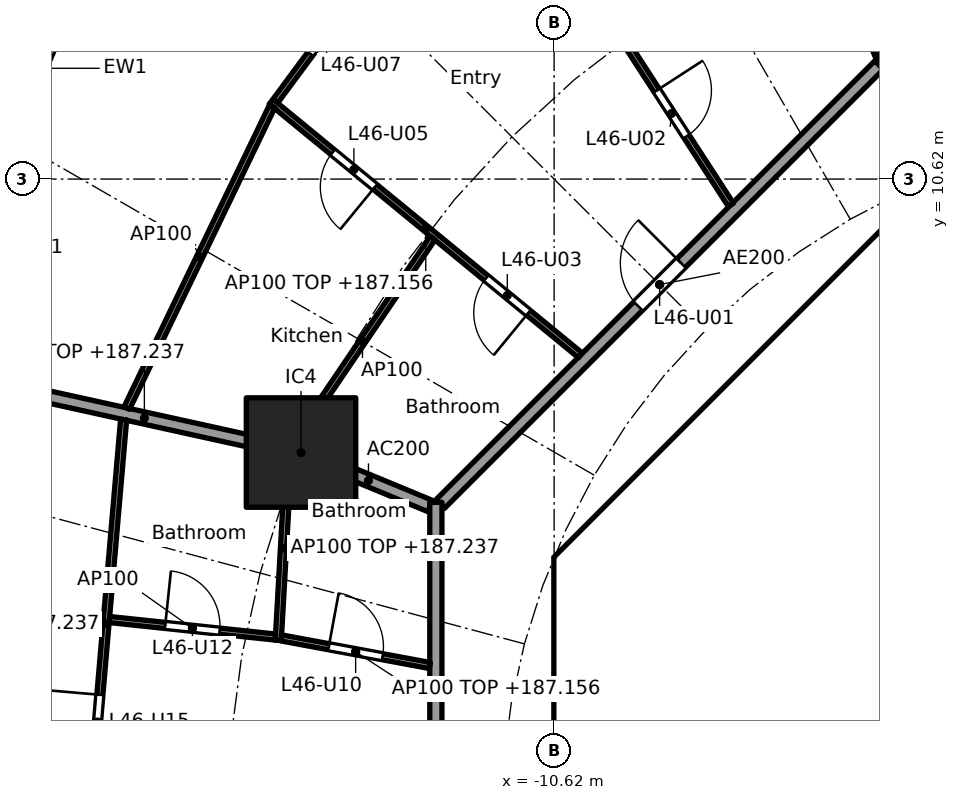
"""IFC4 building model, lengths in metres.
Left out: names, types, materials, properties, quantities, classifications, styles, units other than length and angle.
Written with IfcOpenShell. Run it as: python <this file> out.ifc"""

import sys

from ifc_helpers import new_model, si_unit, direction, frame, frame_2d, origin, origin_2d, place, context, subcontext, project, spatial, polyline, rectangle, outline, extrude, element, fill, save


model = new_model("IFC4")
c1 = context("Model", 3, precision=1e-05, world=origin(), true_north=direction((0.0, 1.0)))
c2 = subcontext(c1, "Body", "Model", "MODEL_VIEW")
j1 = project(units=[si_unit("LENGTHUNIT", "METRE"), si_unit("PLANEANGLEUNIT", "RADIAN")], contexts=[c1])
p1 = place(None, origin())
s1 = spatial("IfcSite", under=j1, at=p1, CompositionType="ELEMENT")
p2 = place(p1, origin())
s2 = spatial("IfcBuilding", under=s1, at=p2, CompositionType="ELEMENT")
p3 = place(p2, frame((0.0, 0.0, 184.4)))
s3 = spatial("IfcBuildingStorey", under=s2, at=p3, CompositionType="ELEMENT", Elevation=184.4)
p4 = place(p3, frame((-14.782, 6.123, 0.0), z_axis=(0.0, 0.0, 1.0), x_axis=(1.0, 0.0, 0.0)))
e1 = element("IfcColumn", 1, at=p4, inside=s3, PredefinedType="COLUMN", context=c2, shape_type="SweptSolid", body=[
    extrude(rectangle(XDim=1.8, YDim=1.8, at=origin_2d()), origin(), (0.0, 0.0, 1.0), 3.7),
])
p5 = place(p3, frame((-19.729, 11.0, 0.0), z_axis=(0.0, 0.0, 1.0), x_axis=(0.397620521824, 0.917549955384, 0.0)))
e2 = element("IfcWall", 2, at=p5, inside=s3, PredefinedType="SOLIDWALL", context=c2, shape_type="SweptSolid", body=[
    extrude(rectangle(XDim=3.142, YDim=0.25, at=frame_2d((1.571, 0.0))), origin(), (0.0, 0.0, 1.0), 3.44),
])
p6 = place(p5, frame((0.521, 0.0, 0.0)))
e3 = element("IfcOpeningElement", 3, at=p6, cuts=e2, PredefinedType="OPENING", context=c2, shape_type="SweptSolid", body=[
    extrude(rectangle(XDim=2.1, YDim=2.4, at=frame_2d((1.05, 1.2))), frame((0.0, 0.135, 0.0), z_axis=(0.0, -1.0, 0.0), x_axis=(1.0, 0.0, 0.0)), (0.0, 0.0, 1.0), 0.27),
])
p7 = place(p3, frame((-4.613, 9.988, 0.0), z_axis=(0.0, 0.0, 1.0), x_axis=(-0.707106781187, -0.707106781187, 0.0)))
e4 = element("IfcWall", 4, at=p7, inside=s3, PredefinedType="SHEAR", context=c2, shape_type="SweptSolid", body=[
    extrude(rectangle(XDim=7.602, YDim=0.6, at=frame_2d((3.801, 0.0))), origin(), (0.0, 0.0, 1.0), 3.44),
])
p8 = place(p7, frame((0.351, 0.0, 0.0)))
e5 = element("IfcOpeningElement", 5, at=p8, cuts=e4, PredefinedType="OPENING", context=c2, shape_type="SweptSolid", body=[
    extrude(rectangle(XDim=1.1, YDim=2.1, at=frame_2d((0.55, 1.05))), frame((0.0, 0.31, 0.0), z_axis=(0.0, -1.0, 0.0), x_axis=(1.0, 0.0, 0.0)), (0.0, 0.0, 1.0), 0.62),
])
p9 = place(p3, frame((-10.325, 3.801, 0.0), z_axis=(0.0, 0.0, 1.0), x_axis=(0.0, -1.0, 0.0)))
e6 = element("IfcWall", 6, at=p9, inside=s3, PredefinedType="SHEAR", context=c2, shape_type="SweptSolid", body=[
    extrude(rectangle(XDim=7.602, YDim=0.6, at=frame_2d((3.801, 0.0))), origin(), (0.0, 0.0, 1.0), 3.44),
])
p10 = place(p9, frame((0.651, 0.0, 0.0)))
e7 = element("IfcOpeningElement", 7, at=p10, cuts=e6, PredefinedType="OPENING", context=c2, shape_type="SweptSolid", body=[
    extrude(rectangle(XDim=1.5, YDim=2.1, at=frame_2d((0.75, 1.05))), frame((0.0, 0.31, 0.0), z_axis=(0.0, -1.0, 0.0), x_axis=(1.0, 0.0, 0.0)), (0.0, 0.0, 1.0), 0.62),
])
p11 = place(p9, frame((5.451, 0.0, 0.0)))
e8 = element("IfcOpeningElement", 8, at=p11, cuts=e6, PredefinedType="OPENING", context=c2, shape_type="SweptSolid", body=[
    extrude(rectangle(XDim=1.5, YDim=2.1, at=frame_2d((0.75, 1.05))), frame((0.0, 0.31, 0.0), z_axis=(0.0, -1.0, 0.0), x_axis=(1.0, 0.0, 0.0)), (0.0, 0.0, 1.0), 0.62),
])
p12 = place(p3, frame((-6.2, 4.3, 0.0), z_axis=(0.0, 0.0, 1.0), x_axis=(0.0, 1.0, 0.0)))
e9 = element("IfcWall", 9, at=p12, inside=s3, PredefinedType="PARTITIONING", context=c2, shape_type="SweptSolid", body=[
    extrude(rectangle(XDim=3.527, YDim=0.15, at=frame_2d((1.763, 0.0))), origin(), (0.0, 0.0, 1.0), 3.44),
])
p13 = place(p12, frame((0.262, 0.0, 0.0)))
e10 = element("IfcOpeningElement", 10, at=p13, cuts=e9, PredefinedType="OPENING", context=c2, shape_type="SweptSolid", body=[
    extrude(rectangle(XDim=0.9, YDim=2.1, at=frame_2d((0.45, 1.05))), frame((0.0, 0.085, 0.0), z_axis=(0.0, -1.0, 0.0), x_axis=(1.0, 0.0, 0.0)), (0.0, 0.0, 1.0), 0.17),
])
p14 = place(p12, frame((2.138, 0.0, 0.0)))
e11 = element("IfcOpeningElement", 11, at=p14, cuts=e9, PredefinedType="OPENING", context=c2, shape_type="SweptSolid", body=[
    extrude(rectangle(XDim=0.9, YDim=2.1, at=frame_2d((0.45, 1.05))), frame((0.0, 0.085, 0.0), z_axis=(0.0, -1.0, 0.0), x_axis=(1.0, 0.0, 0.0)), (0.0, 0.0, 1.0), 0.17),
])
p15 = place(p3, frame((-6.7, 2.0, 0.0), z_axis=(0.0, 0.0, 1.0), x_axis=(1.0, 0.0, 0.0)))
e12 = element("IfcWall", 12, at=p15, inside=s3, PredefinedType="SOLIDWALL", context=c2, shape_type="SweptSolid", body=[
    extrude(rectangle(XDim=13.4, YDim=0.2, at=frame_2d((6.7, 0.0))), origin(), (0.0, 0.0, 1.0), 3.44),
])
p16 = place(p15, frame((7.25, 0.0, 0.0)))
e13 = element("IfcOpeningElement", 13, at=p16, cuts=e12, PredefinedType="OPENING", context=c2, shape_type="SweptSolid", body=[
    extrude(rectangle(XDim=1.1, YDim=2.1, at=frame_2d((0.55, 1.05))), frame((0.0, 0.11, 0.0), z_axis=(0.0, -1.0, 0.0), x_axis=(1.0, 0.0, 0.0)), (0.0, 0.0, 1.0), 0.22),
])
p17 = place(p15, frame((9.45, 0.0, 0.0)))
e14 = element("IfcOpeningElement", 14, at=p17, cuts=e12, PredefinedType="OPENING", context=c2, shape_type="SweptSolid", body=[
    extrude(rectangle(XDim=1.1, YDim=2.1, at=frame_2d((0.55, 1.05))), frame((0.0, 0.11, 0.0), z_axis=(0.0, -1.0, 0.0), x_axis=(1.0, 0.0, 0.0)), (0.0, 0.0, 1.0), 0.22),
])
p18 = place(p15, frame((1.85, 0.0, 0.0)))
e15 = element("IfcOpeningElement", 15, at=p18, cuts=e12, PredefinedType="OPENING", context=c2, shape_type="SweptSolid", body=[
    extrude(rectangle(XDim=0.9, YDim=2.1, at=frame_2d((0.45, 1.05))), frame((0.0, 0.11, 0.0), z_axis=(0.0, -1.0, 0.0), x_axis=(1.0, 0.0, 0.0)), (0.0, 0.0, 1.0), 0.22),
])
p19 = place(p15, frame((5.15, 0.0, 0.0)))
e16 = element("IfcOpeningElement", 16, at=p19, cuts=e12, PredefinedType="OPENING", context=c2, shape_type="SweptSolid", body=[
    extrude(rectangle(XDim=0.9, YDim=2.1, at=frame_2d((0.45, 1.05))), frame((0.0, 0.11, 0.0), z_axis=(0.0, -1.0, 0.0), x_axis=(1.0, 0.0, 0.0)), (0.0, 0.0, 1.0), 0.22),
])
p20 = place(p3, origin())
e17 = element("IfcWall", 17, at=p20, inside=s3, PredefinedType="SHEAR", context=c2, shape_type="SweptSolid", body=[
    extrude(outline(polyline([(-10.2, 4.825), (-9.776, 4.401), (-10.025, 4.152), (-10.025, 3.801), (-10.625, 3.801), (-10.625, 4.401), (-10.2, 4.825)])), origin(), (0.0, 0.0, 1.0), 3.44),
])
p21 = place(p3, frame((-10.025, 4.0, 0.0), z_axis=(0.0, 0.0, 1.0), x_axis=(1.0, 0.0, 0.0)))
e18 = element("IfcWall", 18, at=p21, inside=s3, PredefinedType="PARTITIONING", context=c2, shape_type="SweptSolid", body=[
    extrude(rectangle(XDim=3.325, YDim=0.2, at=frame_2d((1.662, 0.0))), origin(), (0.0, 0.0, 1.0), 3.44),
])
p22 = place(p3, frame((-8.301, 5.8, 0.0), z_axis=(0.0, 0.0, 1.0), x_axis=(1.0, 0.0, 0.0)))
e19 = element("IfcWall", 19, at=p22, inside=s3, PredefinedType="PARTITIONING", context=c2, shape_type="SweptSolid", body=[
    extrude(rectangle(XDim=2.026, YDim=0.15, at=frame_2d((1.013, 0.0))), origin(), (0.0, 0.0, 1.0), 3.44),
])
p23 = place(p3, origin())
e20 = element("IfcWall", 20, at=p23, inside=s3, PredefinedType="SOLIDWALL", context=c2, shape_type="SweptSolid", body=[
    extrude(outline(polyline([(-6.7, 4.3), (6.7, 4.3), (6.7, 2.1), (6.5, 2.1), (6.5, 4.1), (4.5, 4.1), (4.5, 2.1), (4.3, 2.1), (4.3, 4.1), (2.3, 4.1), (2.3, 2.1), (2.1, 2.1), (2.1, 4.1), (0.1, 4.1), (0.1, 2.1), (-0.1, 2.1), (-0.1, 4.1), (-2.1, 4.1), (-2.1, 2.1), (-2.3, 2.1), (-2.3, 4.1), (-6.5, 4.1), (-6.5, 2.1), (-6.7, 2.1), (-6.7, 4.3)])), origin(), (0.0, 0.0, 1.0), 3.44),
])
p24 = place(p3, frame((-5.243, 12.657, 0.0), z_axis=(0.0, 0.0, 1.0), x_axis=(-0.382707856524, 0.923869415315, 0.0)))
e21 = element("IfcWall", 21, at=p24, inside=s3, PredefinedType="PARTITIONING", context=c2, shape_type="SweptSolid", body=[
    extrude(rectangle(XDim=2.2, YDim=0.2, at=frame_2d((1.1, 0.0))), origin(), (0.0, 0.0, 1.0), 3.44),
])
p25 = place(p3, frame((-12.657, 5.243, 0.0), z_axis=(0.0, 0.0, 1.0), x_axis=(-0.923859888513, 0.38273085373, 0.0)))
e22 = element("IfcWall", 22, at=p25, inside=s3, PredefinedType="PARTITIONING", context=c2, shape_type="SweptSolid", body=[
    extrude(rectangle(XDim=2.199, YDim=0.2, at=frame_2d((1.1, 0.0))), origin(), (0.0, 0.0, 1.0), 3.44),
])
p26 = place(p3, frame((-14.831, 6.134, 0.0), z_axis=(0.0, 0.0, 1.0), x_axis=(-0.976568396888, 0.215207263354, 0.0)))
e23 = element("IfcWall", 23, at=p26, inside=s3, PredefinedType="PARTITIONING", context=c2, shape_type="SweptSolid", body=[
    extrude(rectangle(XDim=5.177, YDim=0.2, at=frame_2d((2.588, 0.0))), origin(), (0.0, 0.0, 1.0), 2.837),
])
p27 = place(p3, frame((5.104, 12.565, 0.0), z_axis=(0.0, 0.0, 1.0), x_axis=(-1.0, 0.0, 0.0)))
e24 = element("IfcWall", 24, at=p27, inside=s3, PredefinedType="PARTITIONING", context=c2, shape_type="SweptSolid", body=[
    extrude(rectangle(XDim=10.409, YDim=0.2, at=frame_2d((5.205, 0.0))), origin(), (0.0, 0.0, 1.0), 3.44),
])
p28 = place(p27, frame((6.339, 0.0, 0.0)))
e25 = element("IfcOpeningElement", 25, at=p28, cuts=e24, PredefinedType="OPENING", context=c2, shape_type="SweptSolid", body=[
    extrude(rectangle(XDim=1.0, YDim=2.1, at=frame_2d((0.5, 1.05))), frame((0.0, 0.11, 0.0), z_axis=(0.0, -1.0, 0.0), x_axis=(1.0, 0.0, 0.0)), (0.0, 0.0, 1.0), 0.22),
])
p29 = place(p3, frame((-5.275, 12.494, 0.0), z_axis=(0.0, 0.0, 1.0), x_axis=(-0.707106781187, -0.707106781187, 0.0)))
e26 = element("IfcWall", 26, at=p29, inside=s3, PredefinedType="PARTITIONING", context=c2, shape_type="SweptSolid", body=[
    extrude(rectangle(XDim=10.209, YDim=0.2, at=frame_2d((5.104, 0.0))), origin(), (0.0, 0.0, 1.0), 3.44),
])
p30 = place(p29, frame((4.604, 0.0, 0.0)))
e27 = element("IfcOpeningElement", 27, at=p30, cuts=e26, PredefinedType="OPENING", context=c2, shape_type="SweptSolid", body=[
    extrude(rectangle(XDim=1.0, YDim=2.1, at=frame_2d((0.5, 1.05))), frame((0.0, 0.11, 0.0), z_axis=(0.0, -1.0, 0.0), x_axis=(1.0, 0.0, 0.0)), (0.0, 0.0, 1.0), 0.22),
])
p31 = place(p3, frame((-12.565, 5.304, 0.0), z_axis=(0.0, 0.0, 1.0), x_axis=(0.0, -1.0, 0.0)))
e28 = element("IfcWall", 28, at=p31, inside=s3, PredefinedType="PARTITIONING", context=c2, shape_type="SweptSolid", body=[
    extrude(rectangle(XDim=10.409, YDim=0.2, at=frame_2d((5.205, 0.0))), origin(), (0.0, 0.0, 1.0), 3.44),
])
p32 = place(p31, frame((4.804, 0.0, 0.0)))
e29 = element("IfcOpeningElement", 29, at=p32, cuts=e28, PredefinedType="OPENING", context=c2, shape_type="SweptSolid", body=[
    extrude(rectangle(XDim=1.0, YDim=2.1, at=frame_2d((0.5, 1.05))), frame((0.0, 0.11, 0.0), z_axis=(0.0, -1.0, 0.0), x_axis=(1.0, 0.0, 0.0)), (0.0, 0.0, 1.0), 0.22),
])
p33 = place(p3, frame((-7.712, 10.195, 0.0), z_axis=(0.0, 0.0, 1.0), x_axis=(-0.544179442551, 0.838968851809, 0.0)))
e30 = element("IfcWall", 30, at=p33, inside=s3, PredefinedType="PARTITIONING", context=c2, shape_type="SweptSolid", body=[
    extrude(rectangle(XDim=7.566, YDim=0.1, at=frame_2d((3.783, 0.0))), origin(), (0.0, 0.0, 1.0), 2.756),
])
p34 = place(p33, frame((1.343, 0.0, 0.0)))
e31 = element("IfcOpeningElement", 31, at=p34, cuts=e30, PredefinedType="OPENING", context=c2, shape_type="SweptSolid", body=[
    extrude(rectangle(XDim=0.9, YDim=2.1, at=frame_2d((0.45, 1.05))), frame((0.0, 0.06, 0.0), z_axis=(0.0, -1.0, 0.0), x_axis=(1.0, 0.0, 0.0)), (0.0, 0.0, 1.0), 0.12),
])
p35 = place(p33, frame((5.101, 0.0, 0.0)))
e32 = element("IfcOpeningElement", 32, at=p35, cuts=e30, PredefinedType="OPENING", context=c2, shape_type="SweptSolid", body=[
    extrude(rectangle(XDim=0.9, YDim=2.1, at=frame_2d((0.45, 1.05))), frame((0.0, 0.06, 0.0), z_axis=(0.0, -1.0, 0.0), x_axis=(1.0, 0.0, 0.0)), (0.0, 0.0, 1.0), 0.12),
])
p36 = place(p3, frame((-11.832, 16.461, 0.0), z_axis=(0.0, 0.0, 1.0), x_axis=(-0.594704483906, -0.803944386647, 0.0)))
e33 = element("IfcWall", 33, at=p36, inside=s3, PredefinedType="PARTITIONING", context=c2, shape_type="SweptSolid", body=[
    extrude(rectangle(XDim=5.672, YDim=0.1, at=frame_2d((2.836, 0.0))), origin(), (0.0, 0.0, 1.0), 2.837),
])
p37 = place(p36, frame((0.968, 0.0, 0.0)))
e34 = element("IfcOpeningElement", 34, at=p37, cuts=e33, PredefinedType="OPENING", context=c2, shape_type="SweptSolid", body=[
    extrude(rectangle(XDim=0.9, YDim=2.1, at=frame_2d((0.45, 1.05))), frame((0.0, 0.06, 0.0), z_axis=(0.0, -1.0, 0.0), x_axis=(1.0, 0.0, 0.0)), (0.0, 0.0, 1.0), 0.12),
])
p38 = place(p36, frame((3.804, 0.0, 0.0)))
e35 = element("IfcOpeningElement", 35, at=p38, cuts=e33, PredefinedType="OPENING", context=c2, shape_type="SweptSolid", body=[
    extrude(rectangle(XDim=0.9, YDim=2.1, at=frame_2d((0.45, 1.05))), frame((0.0, 0.06, 0.0), z_axis=(0.0, -1.0, 0.0), x_axis=(1.0, 0.0, 0.0)), (0.0, 0.0, 1.0), 0.12),
])
p39 = place(p3, frame((-10.189, 7.721, 0.0), z_axis=(0.0, 0.0, 1.0), x_axis=(-0.773121441079, 0.634258021112, 0.0)))
e36 = element("IfcWall", 36, at=p39, inside=s3, PredefinedType="PARTITIONING", context=c2, shape_type="SweptSolid", body=[
    extrude(rectangle(XDim=6.577, YDim=0.1, at=frame_2d((3.289, 0.0))), origin(), (0.0, 0.0, 1.0), 2.756),
])
p40 = place(p39, frame((1.104, 0.0, 0.0)))
e37 = element("IfcOpeningElement", 37, at=p40, cuts=e36, PredefinedType="OPENING", context=c2, shape_type="SweptSolid", body=[
    extrude(rectangle(XDim=0.9, YDim=2.1, at=frame_2d((0.45, 1.05))), frame((0.0, 0.06, 0.0), z_axis=(0.0, -1.0, 0.0), x_axis=(1.0, 0.0, 0.0)), (0.0, 0.0, 1.0), 0.12),
])
p41 = place(p39, frame((4.367, 0.0, 0.0)))
e38 = element("IfcOpeningElement", 38, at=p41, cuts=e36, PredefinedType="OPENING", context=c2, shape_type="SweptSolid", body=[
    extrude(rectangle(XDim=0.9, YDim=2.1, at=frame_2d((0.45, 1.05))), frame((0.0, 0.06, 0.0), z_axis=(0.0, -1.0, 0.0), x_axis=(1.0, 0.0, 0.0)), (0.0, 0.0, 1.0), 0.12),
])
p42 = place(p3, frame((-12.619, 9.65, 0.0), z_axis=(0.0, 0.0, 1.0), x_axis=(-0.561046521684, -0.82778427172, 0.0)))
e39 = element("IfcWall", 39, at=p42, inside=s3, PredefinedType="PARTITIONING", context=c2, shape_type="SweptSolid", body=[
    extrude(rectangle(XDim=4.109, YDim=0.1, at=frame_2d((2.054, 0.0))), origin(), (0.0, 0.0, 1.0), 3.44),
])
p43 = place(p3, frame((-15.257, 11.816, 0.0), z_axis=(0.0, 0.0, 1.0), x_axis=(-0.434027506504, -0.900899619046, 0.0)))
e40 = element("IfcWall", 40, at=p43, inside=s3, PredefinedType="PARTITIONING", context=c2, shape_type="SweptSolid", body=[
    extrude(rectangle(XDim=5.508, YDim=0.1, at=frame_2d((2.754, 0.0))), origin(), (0.0, 0.0, 1.0), 3.44),
])
p44 = place(p3, frame((-14.986, 6.067, 0.0), z_axis=(0.0, 0.0, 1.0), x_axis=(-0.056333452925, -0.998412010185, 0.0)))
e41 = element("IfcWall", 41, at=p44, inside=s3, PredefinedType="PARTITIONING", context=c2, shape_type="SweptSolid", body=[
    extrude(rectangle(XDim=3.038, YDim=0.1, at=frame_2d((1.519, 0.0))), origin(), (0.0, 0.0, 1.0), 2.837),
])
p45 = place(p3, frame((-17.7, 6.664, 0.0), z_axis=(0.0, 0.0, 1.0), x_axis=(-0.086004282666, -0.996294767307, 0.0)))
e42 = element("IfcWall", 42, at=p45, inside=s3, PredefinedType="PARTITIONING", context=c2, shape_type="SweptSolid", body=[
    extrude(rectangle(XDim=6.739, YDim=0.1, at=frame_2d((3.37, 0.0))), origin(), (0.0, 0.0, 1.0), 2.837),
])
p46 = place(p45, frame((4.542, 0.0, 0.0)))
e43 = element("IfcOpeningElement", 43, at=p46, cuts=e42, PredefinedType="OPENING", context=c2, shape_type="SweptSolid", body=[
    extrude(rectangle(XDim=0.9, YDim=2.1, at=frame_2d((0.45, 1.05))), frame((0.0, 0.06, 0.0), z_axis=(0.0, -1.0, 0.0), x_axis=(1.0, 0.0, 0.0)), (0.0, 0.0, 1.0), 0.12),
])
p47 = place(p3, frame((-12.663, 2.621, 0.0), z_axis=(0.0, 0.0, 1.0), x_axis=(-0.983176884312, 0.182655999505, 0.0)))
e44 = element("IfcWall", 44, at=p47, inside=s3, PredefinedType="PARTITIONING", context=c2, shape_type="SweptSolid", body=[
    extrude(rectangle(XDim=2.483, YDim=0.1, at=frame_2d((1.242, 0.0))), origin(), (0.0, 0.0, 1.0), 2.756),
])
p48 = place(p47, frame((0.792, 0.0, 0.0)))
e45 = element("IfcOpeningElement", 45, at=p48, cuts=e44, PredefinedType="OPENING", context=c2, shape_type="SweptSolid", body=[
    extrude(rectangle(XDim=0.9, YDim=2.1, at=frame_2d((0.45, 1.05))), frame((0.0, 0.06, 0.0), z_axis=(0.0, -1.0, 0.0), x_axis=(1.0, 0.0, 0.0)), (0.0, 0.0, 1.0), 0.12),
])
p49 = place(p3, frame((-15.204, 3.089, 0.0), z_axis=(0.0, 0.0, 1.0), x_axis=(-0.994477149695, 0.104953316934, 0.0)))
e46 = element("IfcWall", 46, at=p49, inside=s3, PredefinedType="PARTITIONING", context=c2, shape_type="SweptSolid", body=[
    extrude(rectangle(XDim=2.745, YDim=0.1, at=frame_2d((1.373, 0.0))), origin(), (0.0, 0.0, 1.0), 3.44),
])
p50 = place(p49, frame((0.922, 0.0, 0.0)))
e47 = element("IfcOpeningElement", 47, at=p50, cuts=e46, PredefinedType="OPENING", context=c2, shape_type="SweptSolid", body=[
    extrude(rectangle(XDim=0.9, YDim=2.1, at=frame_2d((0.45, 1.05))), frame((0.0, 0.06, 0.0), z_axis=(0.0, -1.0, 0.0), x_axis=(1.0, 0.0, 0.0)), (0.0, 0.0, 1.0), 0.12),
])
p51 = place(p6, origin())
e48 = element("IfcDoor", 48, at=p51, inside=s3, OperationType="SLIDING_TO_LEFT", PredefinedType="DOOR", context=c2, shape_type="SweptSolid", body=[
    extrude(rectangle(XDim=2.1, YDim=2.4, at=frame_2d((1.05, 1.2))), frame((0.0, 0.025, 0.0), z_axis=(0.0, -1.0, 0.0), x_axis=(1.0, 0.0, 0.0)), (0.0, 0.0, 1.0), 0.05),
])
fill(e3, e48)
p52 = place(p13, origin())
e49 = element("IfcDoor", 49, at=p52, inside=s3, OperationType="SINGLE_SWING_RIGHT", PredefinedType="DOOR", context=c2, shape_type="SweptSolid", body=[
    extrude(rectangle(XDim=0.9, YDim=2.1, at=frame_2d((0.45, 1.05))), frame((0.0, 0.025, 0.0), z_axis=(0.0, -1.0, 0.0), x_axis=(1.0, 0.0, 0.0)), (0.0, 0.0, 1.0), 0.05),
])
fill(e10, e49)
p53 = place(p14, origin())
e50 = element("IfcDoor", 50, at=p53, inside=s3, OperationType="SINGLE_SWING_RIGHT", PredefinedType="DOOR", context=c2, shape_type="SweptSolid", body=[
    extrude(rectangle(XDim=0.9, YDim=2.1, at=frame_2d((0.45, 1.05))), frame((0.0, 0.025, 0.0), z_axis=(0.0, -1.0, 0.0), x_axis=(1.0, 0.0, 0.0)), (0.0, 0.0, 1.0), 0.05),
])
fill(e11, e50)
p54 = place(p10, origin())
e51 = element("IfcDoor", 51, at=p54, inside=s3, OperationType="DOUBLE_DOOR_SINGLE_SWING", PredefinedType="DOOR", context=c2, shape_type="SweptSolid", body=[
    extrude(rectangle(XDim=1.5, YDim=2.1, at=frame_2d((0.75, 1.05))), frame((0.0, 0.025, 0.0), z_axis=(0.0, -1.0, 0.0), x_axis=(1.0, 0.0, 0.0)), (0.0, 0.0, 1.0), 0.05),
])
fill(e7, e51)
p55 = place(p8, origin())
e52 = element("IfcDoor", 52, at=p55, inside=s3, OperationType="SINGLE_SWING_RIGHT", PredefinedType="DOOR", context=c2, shape_type="SweptSolid", body=[
    extrude(rectangle(XDim=1.1, YDim=2.1, at=frame_2d((0.55, 1.05))), frame((0.0, 0.025, 0.0), z_axis=(0.0, -1.0, 0.0), x_axis=(1.0, 0.0, 0.0)), (0.0, 0.0, 1.0), 0.05),
])
fill(e5, e52)
p56 = place(p30, frame((1.0, 0.0, 0.0), x_axis=(-1.0, 0.0, 0.0)))
e53 = element("IfcDoor", 53, at=p56, inside=s3, OperationType="SINGLE_SWING_RIGHT", PredefinedType="DOOR", context=c2, shape_type="SweptSolid", body=[
    extrude(rectangle(XDim=1.0, YDim=2.1, at=frame_2d((0.5, 1.05))), frame((0.0, 0.025, 0.0), z_axis=(0.0, -1.0, 0.0), x_axis=(1.0, 0.0, 0.0)), (0.0, 0.0, 1.0), 0.05),
])
fill(e27, e53)
p57 = place(p34, frame((0.9, 0.0, 0.0), x_axis=(-1.0, 0.0, 0.0)))
e54 = element("IfcDoor", 54, at=p57, inside=s3, OperationType="SINGLE_SWING_LEFT", PredefinedType="DOOR", context=c2, shape_type="SweptSolid", body=[
    extrude(rectangle(XDim=0.9, YDim=2.1, at=frame_2d((0.45, 1.05))), frame((0.0, 0.025, 0.0), z_axis=(0.0, -1.0, 0.0), x_axis=(1.0, 0.0, 0.0)), (0.0, 0.0, 1.0), 0.05),
])
fill(e31, e54)
p58 = place(p40, origin())
e55 = element("IfcDoor", 55, at=p58, inside=s3, OperationType="SINGLE_SWING_LEFT", PredefinedType="DOOR", context=c2, shape_type="SweptSolid", body=[
    extrude(rectangle(XDim=0.9, YDim=2.1, at=frame_2d((0.45, 1.05))), frame((0.0, 0.025, 0.0), z_axis=(0.0, -1.0, 0.0), x_axis=(1.0, 0.0, 0.0)), (0.0, 0.0, 1.0), 0.05),
])
fill(e37, e55)
p59 = place(p41, origin())
e56 = element("IfcDoor", 56, at=p59, inside=s3, OperationType="SINGLE_SWING_LEFT", PredefinedType="DOOR", context=c2, shape_type="SweptSolid", body=[
    extrude(rectangle(XDim=0.9, YDim=2.1, at=frame_2d((0.45, 1.05))), frame((0.0, 0.025, 0.0), z_axis=(0.0, -1.0, 0.0), x_axis=(1.0, 0.0, 0.0)), (0.0, 0.0, 1.0), 0.05),
])
fill(e38, e56)
p60 = place(p38, frame((0.9, 0.0, 0.0), x_axis=(-1.0, 0.0, 0.0)))
e57 = element("IfcDoor", 57, at=p60, inside=s3, OperationType="SINGLE_SWING_RIGHT", PredefinedType="DOOR", context=c2, shape_type="SweptSolid", body=[
    extrude(rectangle(XDim=0.9, YDim=2.1, at=frame_2d((0.45, 1.05))), frame((0.0, 0.025, 0.0), z_axis=(0.0, -1.0, 0.0), x_axis=(1.0, 0.0, 0.0)), (0.0, 0.0, 1.0), 0.05),
])
fill(e35, e57)
p61 = place(p48, frame((0.9, 0.0, 0.0), x_axis=(-1.0, 0.0, 0.0)))
e58 = element("IfcDoor", 58, at=p61, inside=s3, OperationType="SINGLE_SWING_LEFT", PredefinedType="DOOR", context=c2, shape_type="SweptSolid", body=[
    extrude(rectangle(XDim=0.9, YDim=2.1, at=frame_2d((0.45, 1.05))), frame((0.0, 0.025, 0.0), z_axis=(0.0, -1.0, 0.0), x_axis=(1.0, 0.0, 0.0)), (0.0, 0.0, 1.0), 0.05),
])
fill(e45, e58)
p62 = place(p50, frame((0.9, 0.0, 0.0), x_axis=(-1.0, 0.0, 0.0)))
e59 = element("IfcDoor", 59, at=p62, inside=s3, OperationType="SINGLE_SWING_LEFT", PredefinedType="DOOR", context=c2, shape_type="SweptSolid", body=[
    extrude(rectangle(XDim=0.9, YDim=2.1, at=frame_2d((0.45, 1.05))), frame((0.0, 0.025, 0.0), z_axis=(0.0, -1.0, 0.0), x_axis=(1.0, 0.0, 0.0)), (0.0, 0.0, 1.0), 0.05),
])
fill(e47, e59)
p63 = place(p46, frame((0.9, 0.0, 0.0), x_axis=(-1.0, 0.0, 0.0)))
e60 = element("IfcDoor", 60, at=p63, inside=s3, OperationType="SINGLE_SWING_RIGHT", PredefinedType="DOOR", context=c2, shape_type="SweptSolid", body=[
    extrude(rectangle(XDim=0.9, YDim=2.1, at=frame_2d((0.45, 1.05))), frame((0.0, 0.025, 0.0), z_axis=(0.0, -1.0, 0.0), x_axis=(1.0, 0.0, 0.0)), (0.0, 0.0, 1.0), 0.05),
])
fill(e43, e60)
save(model, sys.argv[1])
